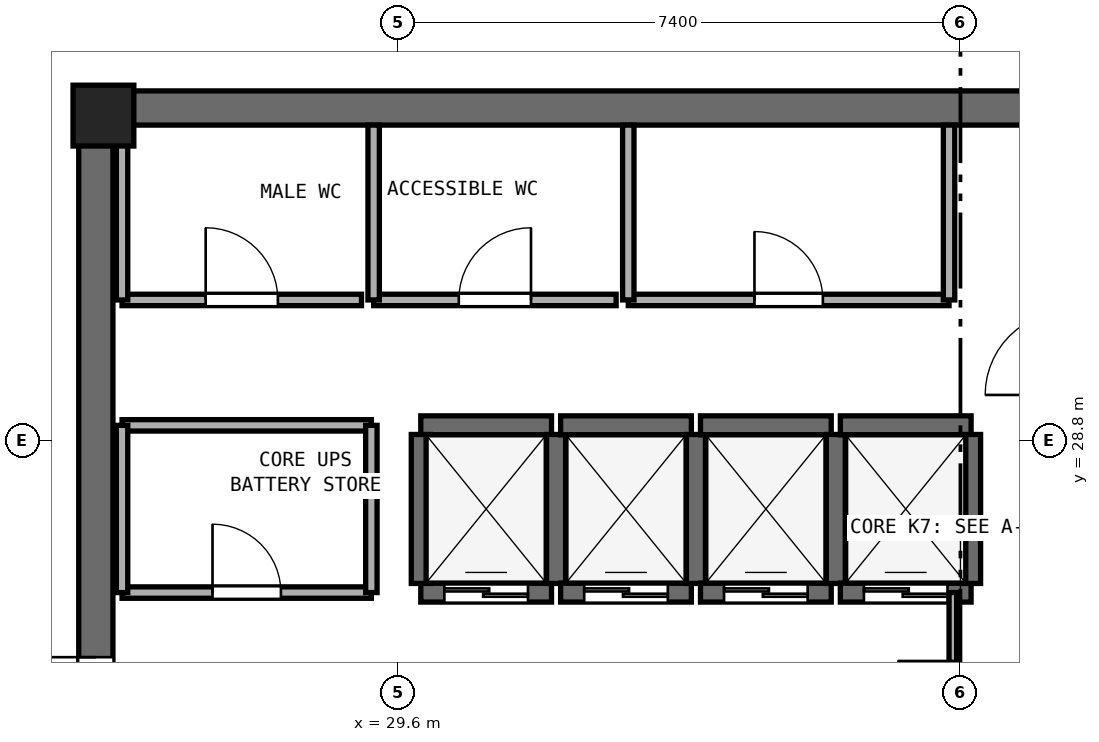
"""IFC4 building model, lengths in metres.
Left out: names, types, materials, properties, quantities, classifications, styles, units other than length and angle.
Written with IfcOpenShell. Run it as: python <this file> out.ifc"""

import sys

from ifc_helpers import new_model, si_unit, direction, frame, frame_2d, origin, origin_2d, place, context, subcontext, project, spatial, rectangle, extrude, element, fill, save


model = new_model("IFC4")
c1 = context("Model", 3, precision=1e-05, world=origin(), true_north=direction((0.0, 1.0)))
c2 = subcontext(c1, "Body", "Model", "MODEL_VIEW")
j1 = project(units=[si_unit("LENGTHUNIT", "METRE"), si_unit("PLANEANGLEUNIT", "RADIAN")], contexts=[c1])
p1 = place(None, origin())
s1 = spatial("IfcSite", under=j1, at=p1, CompositionType="ELEMENT")
p2 = place(p1, origin())
s2 = spatial("IfcBuilding", under=s1, at=p2, CompositionType="ELEMENT")
p3 = place(p2, frame((0.0, 0.0, 289.6)))
s3 = spatial("IfcBuildingStorey", under=s2, at=p3, CompositionType="ELEMENT", Elevation=289.6)
p4 = place(p3, frame((25.4, 33.175, 0.0), z_axis=(0.0, 0.0, 1.0), x_axis=(1.0, 0.0, 0.0)))
e1 = element("IfcWall", 1, at=p4, inside=s3, PredefinedType="SHEAR", context=c2, shape_type="SweptSolid", body=[
    extrude(rectangle(XDim=23.2, YDim=0.45, at=frame_2d((11.6, 0.0))), origin(), (0.0, 0.0, 1.0), 3.54),
])
p5 = place(p3, frame((25.625, 17.45, 0.0), z_axis=(0.0, 0.0, 1.0), x_axis=(0.0, 1.0, 0.0)))
e2 = element("IfcWall", 2, at=p5, inside=s3, PredefinedType="SHEAR", context=c2, shape_type="SweptSolid", body=[
    extrude(rectangle(XDim=15.5, YDim=0.45, at=frame_2d((7.75, 0.0))), origin(), (0.0, 0.0, 1.0), 3.54),
])
p6 = place(p5, frame((7.0, 0.0, 0.0)))
e3 = element("IfcOpeningElement", 3, at=p6, cuts=e2, PredefinedType="OPENING", context=c2, shape_type="SweptSolid", body=[
    extrude(rectangle(XDim=1.5, YDim=2.15, at=frame_2d((0.75, 1.075))), frame((0.0, 0.235, 0.0), z_axis=(0.0, -1.0, 0.0), x_axis=(1.0, 0.0, 0.0)), (0.0, 0.0, 1.0), 0.47),
])
p7 = place(p3, frame((25.725, 33.075, 0.0), z_axis=(0.0, 0.0, 1.0), x_axis=(1.0, 0.0, 0.0)))
e4 = element("IfcColumn", 4, at=p7, inside=s3, PredefinedType="PILASTER", context=c2, shape_type="SweptSolid", body=[
    extrude(rectangle(XDim=0.8, YDim=0.8, at=origin_2d()), origin(), (0.0, 0.0, 1.0), 3.8),
])
p8 = place(p3, frame((29.9, 26.8, 0.0), z_axis=(0.0, 0.0, 1.0), x_axis=(1.0, 0.0, 0.0)))
e5 = element("IfcWall", 5, at=p8, inside=s3, PredefinedType="SHEAR", context=c2, shape_type="SweptSolid", body=[
    extrude(rectangle(XDim=1.72, YDim=0.25, at=frame_2d((0.86, 0.0))), origin(), (0.0, 0.0, 1.0), 3.54),
])
p9 = place(p8, frame((0.31, 0.0, 0.0)))
e6 = element("IfcOpeningElement", 6, at=p9, cuts=e5, PredefinedType="OPENING", context=c2, shape_type="SweptSolid", body=[
    extrude(rectangle(XDim=1.1, YDim=2.15, at=frame_2d((0.55, 1.075))), frame((0.0, 0.135, 0.0), z_axis=(0.0, -1.0, 0.0), x_axis=(1.0, 0.0, 0.0)), (0.0, 0.0, 1.0), 0.27),
])
p10 = place(p3, frame((29.9, 29.0, 0.0), z_axis=(0.0, 0.0, 1.0), x_axis=(1.0, 0.0, 0.0)))
e7 = element("IfcWall", 7, at=p10, inside=s3, PredefinedType="SHEAR", context=c2, shape_type="SweptSolid", body=[
    extrude(rectangle(XDim=1.72, YDim=0.25, at=frame_2d((0.86, 0.0))), origin(), (0.0, 0.0, 1.0), 3.54),
])
for number, where, z_axis, x_axis in (
    (8, (29.9, 26.92, 0.0), (0.0, 0.0, 1.0), (0.0, 1.0, 0.0)),
    (9, (31.68, 26.92, 0.0), (0.0, 0.0, 1.0), (0.0, 1.0, 0.0)),
):
    element("IfcWall", number, at=place(p3, frame(where, z_axis=z_axis, x_axis=x_axis)), inside=s3, PredefinedType="SHEAR", context=c2, shape_type="SweptSolid", body=[
        extrude(rectangle(XDim=1.96, YDim=0.25, at=frame_2d((0.98, 0.0))), origin(), (0.0, 0.0, 1.0), 3.54),
    ])
p11 = place(p3, frame((31.74, 26.8, 0.0), z_axis=(0.0, 0.0, 1.0), x_axis=(1.0, 0.0, 0.0)))
e10 = element("IfcWall", 10, at=p11, inside=s3, PredefinedType="SHEAR", context=c2, shape_type="SweptSolid", body=[
    extrude(rectangle(XDim=1.72, YDim=0.25, at=frame_2d((0.86, 0.0))), origin(), (0.0, 0.0, 1.0), 3.54),
])
p12 = place(p11, frame((0.31, 0.0, 0.0)))
e11 = element("IfcOpeningElement", 11, at=p12, cuts=e10, PredefinedType="OPENING", context=c2, shape_type="SweptSolid", body=[
    extrude(rectangle(XDim=1.1, YDim=2.15, at=frame_2d((0.55, 1.075))), frame((0.0, 0.135, 0.0), z_axis=(0.0, -1.0, 0.0), x_axis=(1.0, 0.0, 0.0)), (0.0, 0.0, 1.0), 0.27),
])
p13 = place(p3, frame((31.74, 29.0, 0.0), z_axis=(0.0, 0.0, 1.0), x_axis=(1.0, 0.0, 0.0)))
e12 = element("IfcWall", 12, at=p13, inside=s3, PredefinedType="SHEAR", context=c2, shape_type="SweptSolid", body=[
    extrude(rectangle(XDim=1.72, YDim=0.25, at=frame_2d((0.86, 0.0))), origin(), (0.0, 0.0, 1.0), 3.54),
])
p14 = place(p3, frame((33.52, 26.92, 0.0), z_axis=(0.0, 0.0, 1.0), x_axis=(0.0, 1.0, 0.0)))
e13 = element("IfcWall", 13, at=p14, inside=s3, PredefinedType="SHEAR", context=c2, shape_type="SweptSolid", body=[
    extrude(rectangle(XDim=1.96, YDim=0.25, at=frame_2d((0.98, 0.0))), origin(), (0.0, 0.0, 1.0), 3.54),
])
p15 = place(p3, frame((33.58, 26.8, 0.0), z_axis=(0.0, 0.0, 1.0), x_axis=(1.0, 0.0, 0.0)))
e14 = element("IfcWall", 14, at=p15, inside=s3, PredefinedType="SHEAR", context=c2, shape_type="SweptSolid", body=[
    extrude(rectangle(XDim=1.72, YDim=0.25, at=frame_2d((0.86, 0.0))), origin(), (0.0, 0.0, 1.0), 3.54),
])
p16 = place(p15, frame((0.31, 0.0, 0.0)))
e15 = element("IfcOpeningElement", 15, at=p16, cuts=e14, PredefinedType="OPENING", context=c2, shape_type="SweptSolid", body=[
    extrude(rectangle(XDim=1.1, YDim=2.15, at=frame_2d((0.55, 1.075))), frame((0.0, 0.135, 0.0), z_axis=(0.0, -1.0, 0.0), x_axis=(1.0, 0.0, 0.0)), (0.0, 0.0, 1.0), 0.27),
])
p17 = place(p3, frame((33.58, 29.0, 0.0), z_axis=(0.0, 0.0, 1.0), x_axis=(1.0, 0.0, 0.0)))
e16 = element("IfcWall", 16, at=p17, inside=s3, PredefinedType="SHEAR", context=c2, shape_type="SweptSolid", body=[
    extrude(rectangle(XDim=1.72, YDim=0.25, at=frame_2d((0.86, 0.0))), origin(), (0.0, 0.0, 1.0), 3.54),
])
p18 = place(p3, frame((35.36, 26.92, 0.0), z_axis=(0.0, 0.0, 1.0), x_axis=(0.0, 1.0, 0.0)))
e17 = element("IfcWall", 17, at=p18, inside=s3, PredefinedType="SHEAR", context=c2, shape_type="SweptSolid", body=[
    extrude(rectangle(XDim=1.96, YDim=0.25, at=frame_2d((0.98, 0.0))), origin(), (0.0, 0.0, 1.0), 3.54),
])
p19 = place(p3, frame((35.42, 26.8, 0.0), z_axis=(0.0, 0.0, 1.0), x_axis=(1.0, 0.0, 0.0)))
e18 = element("IfcWall", 18, at=p19, inside=s3, PredefinedType="SHEAR", context=c2, shape_type="SweptSolid", body=[
    extrude(rectangle(XDim=1.72, YDim=0.25, at=frame_2d((0.86, 0.0))), origin(), (0.0, 0.0, 1.0), 3.54),
])
p20 = place(p19, frame((0.31, 0.0, 0.0)))
e19 = element("IfcOpeningElement", 19, at=p20, cuts=e18, PredefinedType="OPENING", context=c2, shape_type="SweptSolid", body=[
    extrude(rectangle(XDim=1.1, YDim=2.15, at=frame_2d((0.55, 1.075))), frame((0.0, 0.135, 0.0), z_axis=(0.0, -1.0, 0.0), x_axis=(1.0, 0.0, 0.0)), (0.0, 0.0, 1.0), 0.27),
])
p21 = place(p3, frame((35.42, 29.0, 0.0), z_axis=(0.0, 0.0, 1.0), x_axis=(1.0, 0.0, 0.0)))
e20 = element("IfcWall", 20, at=p21, inside=s3, PredefinedType="SHEAR", context=c2, shape_type="SweptSolid", body=[
    extrude(rectangle(XDim=1.72, YDim=0.25, at=frame_2d((0.86, 0.0))), origin(), (0.0, 0.0, 1.0), 3.54),
])
p22 = place(p3, frame((37.14, 26.92, 0.0), z_axis=(0.0, 0.0, 1.0), x_axis=(0.0, 1.0, 0.0)))
e21 = element("IfcWall", 21, at=p22, inside=s3, PredefinedType="SHEAR", context=c2, shape_type="SweptSolid", body=[
    extrude(rectangle(XDim=1.96, YDim=0.25, at=frame_2d((0.98, 0.0))), origin(), (0.0, 0.0, 1.0), 3.54),
])
p23 = place(p3, frame((25.97, 30.65, 0.0), z_axis=(0.0, 0.0, 1.0), x_axis=(1.0, 0.0, 0.0)))
e22 = element("IfcWall", 22, at=p23, inside=s3, PredefinedType="PARTITIONING", context=c2, shape_type="SweptSolid", body=[
    extrude(rectangle(XDim=3.15, YDim=0.15, at=frame_2d((1.575, 0.0))), origin(), (0.0, 0.0, 1.0), 3.54),
])
p24 = place(p23, frame((1.1, 0.0, 0.0)))
e23 = element("IfcOpeningElement", 23, at=p24, cuts=e22, PredefinedType="OPENING", context=c2, shape_type="SweptSolid", body=[
    extrude(rectangle(XDim=0.95, YDim=2.1, at=frame_2d((0.475, 1.05))), frame((0.0, 0.085, 0.0), z_axis=(0.0, -1.0, 0.0), x_axis=(1.0, 0.0, 0.0)), (0.0, 0.0, 1.0), 0.17),
])
p25 = place(p3, frame((25.97, 30.65, 0.0), z_axis=(0.0, 0.0, 1.0), x_axis=(0.0, 1.0, 0.0)))
e24 = element("IfcWall", 24, at=p25, inside=s3, PredefinedType="PARTITIONING", context=c2, shape_type="SweptSolid", body=[
    extrude(rectangle(XDim=2.3, YDim=0.15, at=frame_2d((1.15, 0.0))), origin(), (0.0, 0.0, 1.0), 2.64),
])
p26 = place(p3, frame((29.28, 30.65, 0.0), z_axis=(0.0, 0.0, 1.0), x_axis=(1.0, 0.0, 0.0)))
e25 = element("IfcWall", 25, at=p26, inside=s3, PredefinedType="PARTITIONING", context=c2, shape_type="SweptSolid", body=[
    extrude(rectangle(XDim=3.19, YDim=0.15, at=frame_2d((1.595, 0.0))), origin(), (0.0, 0.0, 1.0), 3.54),
])
p27 = place(p26, frame((1.12, 0.0, 0.0)))
e26 = element("IfcOpeningElement", 26, at=p27, cuts=e25, PredefinedType="OPENING", context=c2, shape_type="SweptSolid", body=[
    extrude(rectangle(XDim=0.95, YDim=2.1, at=frame_2d((0.475, 1.05))), frame((0.0, 0.085, 0.0), z_axis=(0.0, -1.0, 0.0), x_axis=(1.0, 0.0, 0.0)), (0.0, 0.0, 1.0), 0.17),
])
p28 = place(p3, frame((29.28, 30.65, 0.0), z_axis=(0.0, 0.0, 1.0), x_axis=(0.0, 1.0, 0.0)))
e27 = element("IfcWall", 27, at=p28, inside=s3, PredefinedType="PARTITIONING", context=c2, shape_type="SweptSolid", body=[
    extrude(rectangle(XDim=2.3, YDim=0.15, at=frame_2d((1.15, 0.0))), origin(), (0.0, 0.0, 1.0), 3.54),
])
p29 = place(p3, frame((32.63, 30.65, 0.0), z_axis=(0.0, 0.0, 1.0), x_axis=(1.0, 0.0, 0.0)))
e28 = element("IfcWall", 28, at=p29, inside=s3, PredefinedType="PARTITIONING", context=c2, shape_type="SweptSolid", body=[
    extrude(rectangle(XDim=4.22, YDim=0.15, at=frame_2d((2.11, 0.0))), origin(), (0.0, 0.0, 1.0), 3.54),
])
p30 = place(p29, frame((1.66, 0.0, 0.0)))
e29 = element("IfcOpeningElement", 29, at=p30, cuts=e28, PredefinedType="OPENING", context=c2, shape_type="SweptSolid", body=[
    extrude(rectangle(XDim=0.9, YDim=2.1, at=frame_2d((0.45, 1.05))), frame((0.0, 0.085, 0.0), z_axis=(0.0, -1.0, 0.0), x_axis=(1.0, 0.0, 0.0)), (0.0, 0.0, 1.0), 0.17),
])
for number, where, z_axis, x_axis in (
    (30, (32.63, 30.65, 0.0), (0.0, 0.0, 1.0), (0.0, 1.0, 0.0)),
    (31, (36.85, 30.65, 0.0), (0.0, 0.0, 1.0), (0.0, 1.0, 0.0)),
):
    element("IfcWall", number, at=place(p3, frame(where, z_axis=z_axis, x_axis=x_axis)), inside=s3, PredefinedType="PARTITIONING", context=c2, shape_type="SweptSolid", body=[
        extrude(rectangle(XDim=2.3, YDim=0.15, at=frame_2d((1.15, 0.0))), origin(), (0.0, 0.0, 1.0), 3.54),
    ])
p31 = place(p3, frame((25.97, 26.8, 0.0), z_axis=(0.0, 0.0, 1.0), x_axis=(1.0, 0.0, 0.0)))
e32 = element("IfcWall", 32, at=p31, inside=s3, PredefinedType="PARTITIONING", context=c2, shape_type="SweptSolid", body=[
    extrude(rectangle(XDim=3.28, YDim=0.15, at=frame_2d((1.64, 0.0))), origin(), (0.0, 0.0, 1.0), 3.54),
])
p32 = place(p31, frame((1.19, 0.0, 0.0)))
e33 = element("IfcOpeningElement", 33, at=p32, cuts=e32, PredefinedType="OPENING", context=c2, shape_type="SweptSolid", body=[
    extrude(rectangle(XDim=0.9, YDim=2.1, at=frame_2d((0.45, 1.05))), frame((0.0, 0.085, 0.0), z_axis=(0.0, -1.0, 0.0), x_axis=(1.0, 0.0, 0.0)), (0.0, 0.0, 1.0), 0.17),
])
p33 = place(p3, frame((25.97, 29.0, 0.0), z_axis=(0.0, 0.0, 1.0), x_axis=(1.0, 0.0, 0.0)))
e34 = element("IfcWall", 34, at=p33, inside=s3, PredefinedType="PARTITIONING", context=c2, shape_type="SweptSolid", body=[
    extrude(rectangle(XDim=3.28, YDim=0.15, at=frame_2d((1.64, 0.0))), origin(), (0.0, 0.0, 1.0), 3.54),
])
p34 = place(p3, frame((25.97, 26.8, 0.0), z_axis=(0.0, 0.0, 1.0), x_axis=(0.0, 1.0, 0.0)))
e35 = element("IfcWall", 35, at=p34, inside=s3, PredefinedType="PARTITIONING", context=c2, shape_type="SweptSolid", body=[
    extrude(rectangle(XDim=2.2, YDim=0.15, at=frame_2d((1.1, 0.0))), origin(), (0.0, 0.0, 1.0), 2.64),
])
p35 = place(p3, frame((29.25, 26.8, 0.0), z_axis=(0.0, 0.0, 1.0), x_axis=(0.0, 1.0, 0.0)))
e36 = element("IfcWall", 36, at=p35, inside=s3, PredefinedType="PARTITIONING", context=c2, shape_type="SweptSolid", body=[
    extrude(rectangle(XDim=2.2, YDim=0.15, at=frame_2d((1.1, 0.0))), origin(), (0.0, 0.0, 1.0), 3.54),
])
p36 = place(p3, frame((36.9, 23.6, 0.0), z_axis=(0.0, 0.0, 1.0), x_axis=(0.0, 1.0, 0.0)))
e37 = element("IfcWall", 37, at=p36, inside=s3, PredefinedType="PARTITIONING", context=c2, shape_type="SweptSolid", body=[
    extrude(rectangle(XDim=3.2, YDim=0.1, at=frame_2d((1.6, 0.0))), origin(), (0.0, 0.0, 1.0), 3.54),
])
p37 = place(p36, frame((0.85, 0.0, 0.0)))
e38 = element("IfcOpeningElement", 38, at=p37, cuts=e37, PredefinedType="OPENING", context=c2, shape_type="SweptSolid", body=[
    extrude(rectangle(XDim=1.45, YDim=2.12, at=frame_2d((0.725, 1.06))), frame((0.0, 0.06, 0.0), z_axis=(0.0, -1.0, 0.0), x_axis=(1.0, 0.0, 0.0)), (0.0, 0.0, 1.0), 0.12),
])
p38 = place(p9, origin())
e39 = element("IfcDoor", 39, at=p38, inside=s3, OperationType="DOUBLE_DOOR_SLIDING", PredefinedType="DOOR", context=c2, shape_type="SweptSolid", body=[
    extrude(rectangle(XDim=1.1, YDim=2.15, at=frame_2d((0.55, 1.075))), frame((0.0, 0.025, 0.0), z_axis=(0.0, -1.0, 0.0), x_axis=(1.0, 0.0, 0.0)), (0.0, 0.0, 1.0), 0.05),
])
fill(e6, e39)
p39 = place(p12, origin())
e40 = element("IfcDoor", 40, at=p39, inside=s3, OperationType="DOUBLE_DOOR_SLIDING", PredefinedType="DOOR", context=c2, shape_type="SweptSolid", body=[
    extrude(rectangle(XDim=1.1, YDim=2.15, at=frame_2d((0.55, 1.075))), frame((0.0, 0.025, 0.0), z_axis=(0.0, -1.0, 0.0), x_axis=(1.0, 0.0, 0.0)), (0.0, 0.0, 1.0), 0.05),
])
fill(e11, e40)
p40 = place(p16, origin())
e41 = element("IfcDoor", 41, at=p40, inside=s3, OperationType="DOUBLE_DOOR_SLIDING", PredefinedType="DOOR", context=c2, shape_type="SweptSolid", body=[
    extrude(rectangle(XDim=1.1, YDim=2.15, at=frame_2d((0.55, 1.075))), frame((0.0, 0.025, 0.0), z_axis=(0.0, -1.0, 0.0), x_axis=(1.0, 0.0, 0.0)), (0.0, 0.0, 1.0), 0.05),
])
fill(e15, e41)
p41 = place(p20, origin())
e42 = element("IfcDoor", 42, at=p41, inside=s3, OperationType="DOUBLE_DOOR_SLIDING", PredefinedType="DOOR", context=c2, shape_type="SweptSolid", body=[
    extrude(rectangle(XDim=1.1, YDim=2.15, at=frame_2d((0.55, 1.075))), frame((0.0, 0.025, 0.0), z_axis=(0.0, -1.0, 0.0), x_axis=(1.0, 0.0, 0.0)), (0.0, 0.0, 1.0), 0.05),
])
fill(e19, e42)
p42 = place(p6, origin())
e43 = element("IfcDoor", 43, at=p42, inside=s3, OperationType="DOUBLE_DOOR_SINGLE_SWING", PredefinedType="DOOR", context=c2, shape_type="SweptSolid", body=[
    extrude(rectangle(XDim=1.5, YDim=2.15, at=frame_2d((0.75, 1.075))), frame((0.0, 0.025, 0.0), z_axis=(0.0, -1.0, 0.0), x_axis=(1.0, 0.0, 0.0)), (0.0, 0.0, 1.0), 0.05),
])
fill(e3, e43)
p43 = place(p24, origin())
e44 = element("IfcDoor", 44, at=p43, inside=s3, OperationType="SINGLE_SWING_LEFT", PredefinedType="DOOR", context=c2, shape_type="SweptSolid", body=[
    extrude(rectangle(XDim=0.95, YDim=2.1, at=frame_2d((0.475, 1.05))), frame((0.0, 0.025, 0.0), z_axis=(0.0, -1.0, 0.0), x_axis=(1.0, 0.0, 0.0)), (0.0, 0.0, 1.0), 0.05),
])
fill(e23, e44)
p44 = place(p27, origin())
e45 = element("IfcDoor", 45, at=p44, inside=s3, OperationType="SINGLE_SWING_RIGHT", PredefinedType="DOOR", context=c2, shape_type="SweptSolid", body=[
    extrude(rectangle(XDim=0.95, YDim=2.1, at=frame_2d((0.475, 1.05))), frame((0.0, 0.025, 0.0), z_axis=(0.0, -1.0, 0.0), x_axis=(1.0, 0.0, 0.0)), (0.0, 0.0, 1.0), 0.05),
])
fill(e26, e45)
p45 = place(p30, origin())
e46 = element("IfcDoor", 46, at=p45, inside=s3, OperationType="SINGLE_SWING_LEFT", PredefinedType="DOOR", context=c2, shape_type="SweptSolid", body=[
    extrude(rectangle(XDim=0.9, YDim=2.1, at=frame_2d((0.45, 1.05))), frame((0.0, 0.025, 0.0), z_axis=(0.0, -1.0, 0.0), x_axis=(1.0, 0.0, 0.0)), (0.0, 0.0, 1.0), 0.05),
])
fill(e29, e46)
p46 = place(p32, origin())
e47 = element("IfcDoor", 47, at=p46, inside=s3, OperationType="SINGLE_SWING_LEFT", PredefinedType="DOOR", context=c2, shape_type="SweptSolid", body=[
    extrude(rectangle(XDim=0.9, YDim=2.1, at=frame_2d((0.45, 1.05))), frame((0.0, 0.025, 0.0), z_axis=(0.0, -1.0, 0.0), x_axis=(1.0, 0.0, 0.0)), (0.0, 0.0, 1.0), 0.05),
])
fill(e33, e47)
p47 = place(p37, origin())
e48 = element("IfcDoor", 48, at=p47, inside=s3, OperationType="DOUBLE_DOOR_SINGLE_SWING", PredefinedType="DOOR", context=c2, shape_type="SweptSolid", body=[
    extrude(rectangle(XDim=1.45, YDim=2.12, at=frame_2d((0.725, 1.06))), frame((0.0, 0.025, 0.0), z_axis=(0.0, -1.0, 0.0), x_axis=(1.0, 0.0, 0.0)), (0.0, 0.0, 1.0), 0.05),
])
fill(e38, e48)
save(model, sys.argv[1])
